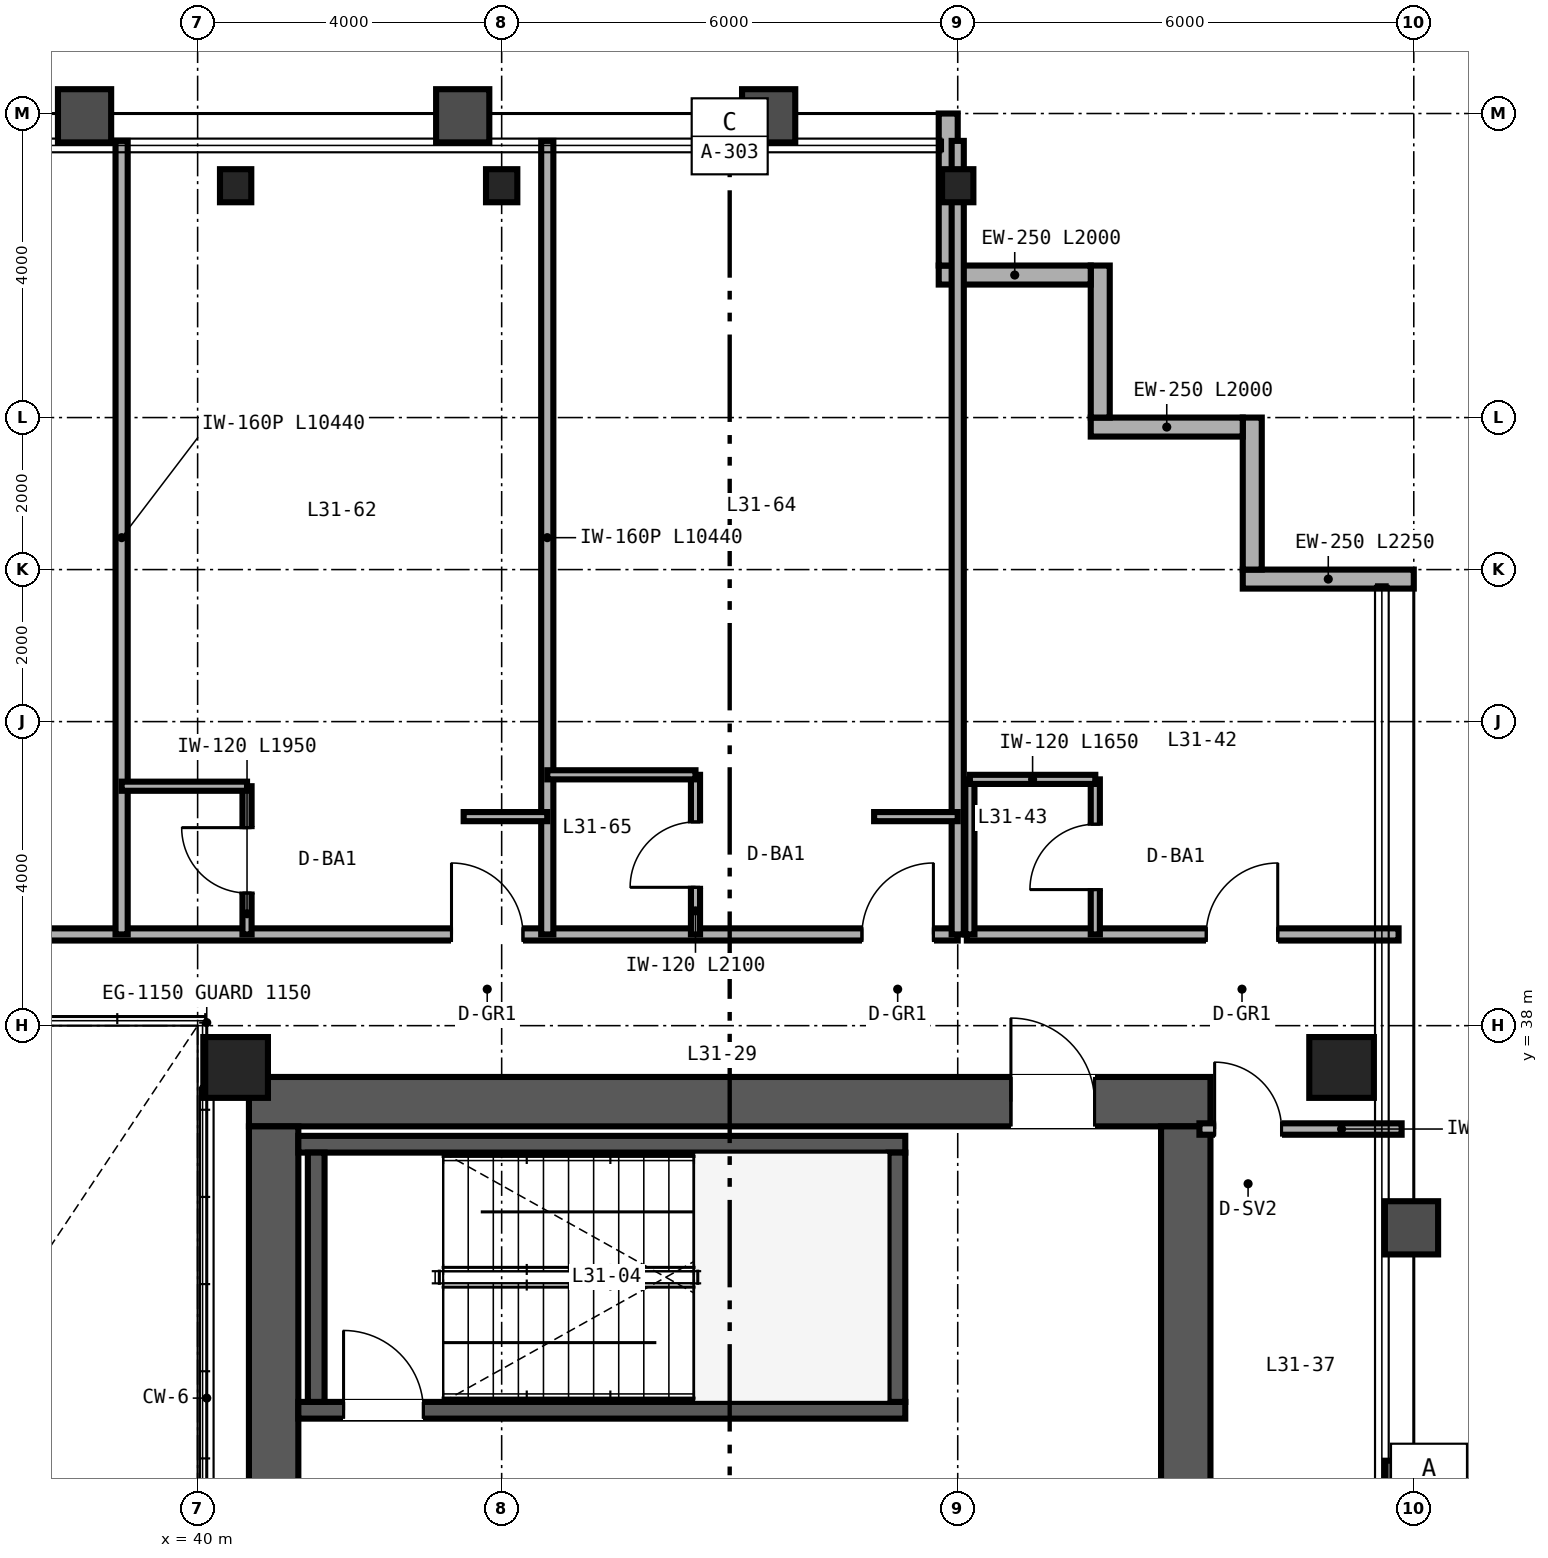
"""IFC4 building model, lengths in metres.
Left out: names, types, materials, properties, quantities, classifications, styles, units other than length and angle.
Written with IfcOpenShell. Run it as: python <this file> out.ifc"""

import sys

from ifc_helpers import new_model, si_unit, direction, frame, frame_2d, origin, origin_2d, place, context, subcontext, project, spatial, rectangle, hollow_rectangle, i_section, extrude, source, transform, mapped, element, fill, save


model = new_model("IFC4")
c1 = context("Model", 3, precision=1e-05, world=origin(), true_north=direction((0.0, 1.0)))
c2 = subcontext(c1, "Body", "Model", "MODEL_VIEW")
j1 = project(units=[si_unit("LENGTHUNIT", "METRE"), si_unit("PLANEANGLEUNIT", "RADIAN")], contexts=[c1])
p1 = place(None, origin())
s1 = spatial("IfcSite", under=j1, at=p1, CompositionType="ELEMENT")
p2 = place(p1, origin())
s2 = spatial("IfcBuilding", under=s1, at=p2, CompositionType="ELEMENT")
p3 = place(p2, frame((0.0, 0.0, 126.0)))
s3 = spatial("IfcBuildingStorey", under=s2, at=p3, CompositionType="ELEMENT", Elevation=126.0)
p4 = place(p3, frame((40.675, 37.0, 0.0), z_axis=(0.0, 0.0, 1.0), x_axis=(1.0, 0.0, 0.0)))
e1 = element("IfcWall", 1, at=p4, inside=s3, PredefinedType="SHEAR", context=c2, shape_type="SweptSolid", body=[
    extrude(rectangle(XDim=12.65, YDim=0.65, at=frame_2d((6.325, 0.0))), origin(), (0.0, 0.0, 1.0), 3.36),
])
p5 = place(p4, frame((10.025, 0.0, 0.0)))
e2 = element("IfcOpeningElement", 2, at=p5, cuts=e1, PredefinedType="OPENING", context=c2, shape_type="SweptSolid", body=[
    extrude(rectangle(XDim=1.1, YDim=2.15, at=frame_2d((0.55, 1.075))), frame((0.0, 0.335, 0.0), z_axis=(0.0, -1.0, 0.0), x_axis=(1.0, 0.0, 0.0)), (0.0, 0.0, 1.0), 0.67),
])
for number, where, z_axis, x_axis in (
    (3, (41.0, 15.325, 0.0), (0.0, 0.0, 1.0), (0.0, 1.0, 0.0)),
    (4, (53.0, 15.325, 0.0), (0.0, 0.0, 1.0), (0.0, 1.0, 0.0)),
):
    element("IfcWall", number, at=place(p3, frame(where, z_axis=z_axis, x_axis=x_axis)), inside=s3, PredefinedType="SHEAR", context=c2, shape_type="SweptSolid", body=[
        extrude(rectangle(XDim=21.35, YDim=0.65, at=frame_2d((10.675, 0.0))), origin(), (0.0, 0.0, 1.0), 3.36),
    ])
p6 = place(p3, frame((41.325, 32.94, 0.0), z_axis=(0.0, 0.0, 1.0), x_axis=(1.0, 0.0, 0.0)))
e5 = element("IfcWall", 5, at=p6, inside=s3, PredefinedType="SHEAR", context=c2, shape_type="SweptSolid", body=[
    extrude(rectangle(XDim=7.985, YDim=0.22, at=frame_2d((3.993, 0.0))), origin(), (0.0, 0.0, 1.0), 3.4),
])
p7 = place(p6, frame((0.595, 0.0, 0.0)))
e6 = element("IfcOpeningElement", 6, at=p7, cuts=e5, PredefinedType="OPENING", context=c2, shape_type="SweptSolid", body=[
    extrude(rectangle(XDim=1.05, YDim=2.15, at=frame_2d((0.525, 1.075))), frame((0.0, 0.12, 0.0), z_axis=(0.0, -1.0, 0.0), x_axis=(1.0, 0.0, 0.0)), (0.0, 0.0, 1.0), 0.24),
])
p8 = place(p3, frame((41.325, 36.44, 0.0), z_axis=(0.0, 0.0, 1.0), x_axis=(1.0, 0.0, 0.0)))
e7 = element("IfcWall", 7, at=p8, inside=s3, PredefinedType="SHEAR", context=c2, shape_type="SweptSolid", body=[
    extrude(rectangle(XDim=7.985, YDim=0.22, at=frame_2d((3.993, 0.0))), origin(), (0.0, 0.0, 1.0), 3.4),
])
for number, where, z_axis, x_axis in (
    (8, (41.56, 33.05, 0.0), (0.0, 0.0, 1.0), (0.0, 1.0, 0.0)),
    (9, (49.2, 33.05, 0.0), (0.0, 0.0, 1.0), (0.0, 1.0, 0.0)),
):
    element("IfcWall", number, at=place(p3, frame(where, z_axis=z_axis, x_axis=x_axis)), inside=s3, PredefinedType="SHEAR", context=c2, shape_type="SweptSolid", body=[
        extrude(rectangle(XDim=3.28, YDim=0.22, at=frame_2d((1.64, 0.0))), origin(), (0.0, 0.0, 1.0), 3.4),
    ])
m1 = source(origin(), c2, "Body", "SweptSolid", [
    extrude(hollow_rectangle(XDim=0.85, YDim=0.8, WallThickness=0.032, at=origin_2d()), origin(), (0.0, 0.0, 1.0), 3.36),
])
for number, where, z_axis, x_axis in (
    (10, (40.5, 37.45, 0.0), (0.0, 0.0, 1.0), (1.0, 0.0, 0.0)),
    (11, (55.05, 37.45, 0.0), (0.0, 0.0, 1.0), (1.0, 0.0, 0.0)),
):
    element("IfcColumn", number, at=place(p3, frame(where, z_axis=z_axis, x_axis=x_axis)), inside=s3, PredefinedType="COLUMN", context=c2, shape_type="MappedRepresentation", body=[
        mapped(m1, transform((0.0, 0.0, 0.0), scale=1.0)),
    ])
m2 = source(origin(), c2, "Body", "SweptSolid", [
    extrude(i_section(OverallWidth=0.412, OverallDepth=0.435, WebThickness=0.036, FlangeThickness=0.057, FilletRadius=0.025, at=origin_2d()), origin(), (0.0, 0.0, 1.0), 3.36),
])
for number, where, z_axis, x_axis in (
    (12, (40.5, 49.05, 0.0), (0.0, 0.0, 1.0), (1.0, 0.0, 0.0)),
    (13, (44.0, 49.05, 0.0), (0.0, 0.0, 1.0), (1.0, 0.0, 0.0)),
    (14, (50.0, 49.05, 0.0), (0.0, 0.0, 1.0), (1.0, 0.0, 0.0)),
):
    element("IfcColumn", number, at=place(p3, frame(where, z_axis=z_axis, x_axis=x_axis)), inside=s3, PredefinedType="COLUMN", context=c2, shape_type="MappedRepresentation", body=[
        mapped(m2, transform((0.0, 0.0, 0.0), scale=1.0)),
    ])
p9 = place(p3, frame((56.0, 43.875, 0.0), z_axis=(0.0, 0.0, 1.0), x_axis=(-1.0, 0.0, 0.0)))
e15 = element("IfcWall", 15, at=p9, inside=s3, PredefinedType="SOLIDWALL", context=c2, shape_type="SweptSolid", body=[
    extrude(rectangle(XDim=2.25, YDim=0.25, at=frame_2d((1.125, 0.0))), origin(), (0.0, 0.0, 1.0), 3.36),
])
for number, where, z_axis, x_axis in (
    (16, (53.875, 44.0, 0.0), (0.0, 0.0, 1.0), (0.0, 1.0, 0.0)),
    (17, (53.75, 45.875, 0.0), (0.0, 0.0, 1.0), (-1.0, 0.0, 0.0)),
    (18, (51.875, 46.0, 0.0), (0.0, 0.0, 1.0), (0.0, 1.0, 0.0)),
    (19, (51.75, 47.875, 0.0), (0.0, 0.0, 1.0), (-1.0, 0.0, 0.0)),
):
    element("IfcWall", number, at=place(p3, frame(where, z_axis=z_axis, x_axis=x_axis)), inside=s3, PredefinedType="SOLIDWALL", context=c2, shape_type="SweptSolid", body=[
        extrude(rectangle(XDim=2.0, YDim=0.25, at=frame_2d((1.0, 0.0))), origin(), (0.0, 0.0, 1.0), 3.36),
    ])
p10 = place(p3, frame((49.875, 48.0, 0.0), z_axis=(0.0, 0.0, 1.0), x_axis=(0.0, 1.0, 0.0)))
e20 = element("IfcWall", 20, at=p10, inside=s3, PredefinedType="SOLIDWALL", context=c2, shape_type="SweptSolid", body=[
    extrude(rectangle(XDim=2.0, YDim=0.25, at=frame_2d((1.0, 0.0))), origin(), (0.0, 0.0, 1.0), 2.667),
])
p11 = place(p3, frame((53.18, 36.64, 0.0), z_axis=(0.0, 0.0, 1.0), x_axis=(1.0, 0.0, 0.0)))
e21 = element("IfcWall", 21, at=p11, inside=s3, PredefinedType="PARTITIONING", context=c2, shape_type="SweptSolid", body=[
    extrude(rectangle(XDim=2.66, YDim=0.15, at=frame_2d((1.33, 0.0))), origin(), (0.0, 0.0, 1.0), 2.743),
])
p12 = place(p11, frame((0.2, 0.0, 0.0)))
e22 = element("IfcOpeningElement", 22, at=p12, cuts=e21, PredefinedType="OPENING", context=c2, shape_type="SweptSolid", body=[
    extrude(rectangle(XDim=0.88, YDim=2.15, at=frame_2d((0.44, 1.075))), frame((0.0, 0.085, 0.0), z_axis=(0.0, -1.0, 0.0), x_axis=(1.0, 0.0, 0.0)), (0.0, 0.0, 1.0), 0.17),
])
p13 = place(p3, frame((50.12, 39.2, 0.0), z_axis=(0.0, 0.0, 1.0), x_axis=(1.0, 0.0, 0.0)))
e23 = element("IfcWall", 23, at=p13, inside=s3, PredefinedType="PARTITIONING", context=c2, shape_type="SweptSolid", body=[
    extrude(rectangle(XDim=5.68, YDim=0.16, at=frame_2d((2.84, 0.0))), origin(), (0.0, 0.0, 1.0), 3.36),
])
p14 = place(p13, frame((3.15, 0.0, 0.0)))
e24 = element("IfcOpeningElement", 24, at=p14, cuts=e23, PredefinedType="OPENING", context=c2, shape_type="SweptSolid", body=[
    extrude(rectangle(XDim=0.94, YDim=2.15, at=frame_2d((0.47, 1.075))), frame((0.0, 0.09, 0.0), z_axis=(0.0, -1.0, 0.0), x_axis=(1.0, 0.0, 0.0)), (0.0, 0.0, 1.0), 0.18),
])
p15 = place(p3, frame((51.81, 39.2, 0.0), z_axis=(0.0, 0.0, 1.0), x_axis=(0.0, 1.0, 0.0)))
e25 = element("IfcWall", 25, at=p15, inside=s3, PredefinedType="PARTITIONING", context=c2, shape_type="SweptSolid", body=[
    extrude(rectangle(XDim=2.04, YDim=0.12, at=frame_2d((1.02, 0.0))), origin(), (0.0, 0.0, 1.0), 3.36),
])
p16 = place(p15, frame((0.59, 0.0, 0.0)))
e26 = element("IfcOpeningElement", 26, at=p16, cuts=e25, PredefinedType="OPENING", context=c2, shape_type="SweptSolid", body=[
    extrude(rectangle(XDim=0.86, YDim=2.1, at=frame_2d((0.43, 1.05))), frame((0.0, 0.07, 0.0), z_axis=(0.0, -1.0, 0.0), x_axis=(1.0, 0.0, 0.0)), (0.0, 0.0, 1.0), 0.14),
])
p17 = place(p3, frame((50.16, 39.2, 0.0), z_axis=(0.0, 0.0, 1.0), x_axis=(0.0, 1.0, 0.0)))
e27 = element("IfcWall", 27, at=p17, inside=s3, PredefinedType="PARTITIONING", context=c2, shape_type="SweptSolid", body=[
    extrude(rectangle(XDim=2.04, YDim=0.12, at=frame_2d((1.02, 0.0))), origin(), (0.0, 0.0, 1.0), 3.36),
])
p18 = place(p3, frame((50.16, 41.24, 0.0), z_axis=(0.0, 0.0, 1.0), x_axis=(1.0, 0.0, 0.0)))
e28 = element("IfcWall", 28, at=p18, inside=s3, PredefinedType="PARTITIONING", context=c2, shape_type="SweptSolid", body=[
    extrude(rectangle(XDim=1.65, YDim=0.12, at=frame_2d((0.825, 0.0))), origin(), (0.0, 0.0, 1.0), 3.36),
])
p19 = place(p3, frame((14.0, 39.2, 0.0), z_axis=(0.0, 0.0, 1.0), x_axis=(1.0, 0.0, 0.0)))
e29 = element("IfcWall", 29, at=p19, inside=s3, PredefinedType="PARTITIONING", context=c2, shape_type="SweptSolid", body=[
    extrude(rectangle(XDim=36.0, YDim=0.16, at=frame_2d((18.0, 0.0))), origin(), (0.0, 0.0, 1.0), 2.581),
])
p20 = place(p19, frame((4.94, 0.0, 0.0)))
e30 = element("IfcOpeningElement", 30, at=p20, cuts=e29, PredefinedType="OPENING", context=c2, shape_type="SweptSolid", body=[
    extrude(rectangle(XDim=0.94, YDim=2.15, at=frame_2d((0.47, 1.075))), frame((0.0, 0.09, 0.0), z_axis=(0.0, -1.0, 0.0), x_axis=(1.0, 0.0, 0.0)), (0.0, 0.0, 1.0), 0.18),
])
p21 = place(p19, frame((11.14, 0.0, 0.0)))
e31 = element("IfcOpeningElement", 31, at=p21, cuts=e29, PredefinedType="OPENING", context=c2, shape_type="SweptSolid", body=[
    extrude(rectangle(XDim=0.94, YDim=2.15, at=frame_2d((0.47, 1.075))), frame((0.0, 0.09, 0.0), z_axis=(0.0, -1.0, 0.0), x_axis=(1.0, 0.0, 0.0)), (0.0, 0.0, 1.0), 0.18),
])
p22 = place(p19, frame((15.12, 0.0, 0.0)))
e32 = element("IfcOpeningElement", 32, at=p22, cuts=e29, PredefinedType="OPENING", context=c2, shape_type="SweptSolid", body=[
    extrude(rectangle(XDim=0.96, YDim=2.15, at=frame_2d((0.48, 1.075))), frame((0.0, 0.09, 0.0), z_axis=(0.0, -1.0, 0.0), x_axis=(1.0, 0.0, 0.0)), (0.0, 0.0, 1.0), 0.18),
])
p23 = place(p19, frame((21.42, 0.0, 0.0)))
e33 = element("IfcOpeningElement", 33, at=p23, cuts=e29, PredefinedType="OPENING", context=c2, shape_type="SweptSolid", body=[
    extrude(rectangle(XDim=0.96, YDim=2.15, at=frame_2d((0.48, 1.075))), frame((0.0, 0.09, 0.0), z_axis=(0.0, -1.0, 0.0), x_axis=(1.0, 0.0, 0.0)), (0.0, 0.0, 1.0), 0.18),
])
p24 = place(p19, frame((29.34, 0.0, 0.0)))
e34 = element("IfcOpeningElement", 34, at=p24, cuts=e29, PredefinedType="OPENING", context=c2, shape_type="SweptSolid", body=[
    extrude(rectangle(XDim=0.94, YDim=2.15, at=frame_2d((0.47, 1.075))), frame((0.0, 0.09, 0.0), z_axis=(0.0, -1.0, 0.0), x_axis=(1.0, 0.0, 0.0)), (0.0, 0.0, 1.0), 0.18),
])
p25 = place(p19, frame((34.74, 0.0, 0.0)))
e35 = element("IfcOpeningElement", 35, at=p25, cuts=e29, PredefinedType="OPENING", context=c2, shape_type="SweptSolid", body=[
    extrude(rectangle(XDim=0.94, YDim=2.15, at=frame_2d((0.47, 1.075))), frame((0.0, 0.09, 0.0), z_axis=(0.0, -1.0, 0.0), x_axis=(1.0, 0.0, 0.0)), (0.0, 0.0, 1.0), 0.18),
])
p26 = place(p3, frame((50.0, 39.2, 0.0), z_axis=(0.0, 0.0, 1.0), x_axis=(0.0, 1.0, 0.0)))
e36 = element("IfcWall", 36, at=p26, inside=s3, PredefinedType="PARTITIONING", context=c2, shape_type="SweptSolid", body=[
    extrude(rectangle(XDim=10.44, YDim=0.16, at=frame_2d((5.22, 0.0))), origin(), (0.0, 0.0, 1.0), 2.667),
])
p27 = place(p3, frame((39.0, 39.2, 0.0), z_axis=(0.0, 0.0, 1.0), x_axis=(0.0, 1.0, 0.0)))
e37 = element("IfcWall", 37, at=p27, inside=s3, PredefinedType="PARTITIONING", context=c2, shape_type="SweptSolid", body=[
    extrude(rectangle(XDim=10.44, YDim=0.16, at=frame_2d((5.22, 0.0))), origin(), (0.0, 0.0, 1.0), 2.433),
])
p28 = place(p3, frame((44.6, 39.2, 0.0), z_axis=(0.0, 0.0, 1.0), x_axis=(0.0, 1.0, 0.0)))
e38 = element("IfcWall", 38, at=p28, inside=s3, PredefinedType="PARTITIONING", context=c2, shape_type="SweptSolid", body=[
    extrude(rectangle(XDim=10.44, YDim=0.16, at=frame_2d((5.22, 0.0))), origin(), (0.0, 0.0, 1.0), 2.667),
])
p29 = place(p3, frame((40.65, 39.2, 0.0), z_axis=(0.0, 0.0, 1.0), x_axis=(0.0, 1.0, 0.0)))
e39 = element("IfcWall", 39, at=p29, inside=s3, PredefinedType="PARTITIONING", context=c2, shape_type="SweptSolid", body=[
    extrude(rectangle(XDim=1.95, YDim=0.12, at=frame_2d((0.975, 0.0))), origin(), (0.0, 0.0, 1.0), 2.581),
])
p30 = place(p29, frame((0.545, 0.0, 0.0)))
e40 = element("IfcOpeningElement", 40, at=p30, cuts=e39, PredefinedType="OPENING", context=c2, shape_type="SweptSolid", body=[
    extrude(rectangle(XDim=0.86, YDim=2.1, at=frame_2d((0.43, 1.05))), frame((0.0, 0.07, 0.0), z_axis=(0.0, -1.0, 0.0), x_axis=(1.0, 0.0, 0.0)), (0.0, 0.0, 1.0), 0.14),
])
p31 = place(p3, frame((39.0, 41.15, 0.0), z_axis=(0.0, 0.0, 1.0), x_axis=(1.0, 0.0, 0.0)))
e41 = element("IfcWall", 41, at=p31, inside=s3, PredefinedType="PARTITIONING", context=c2, shape_type="SweptSolid", body=[
    extrude(rectangle(XDim=1.65, YDim=0.12, at=frame_2d((0.825, 0.0))), origin(), (0.0, 0.0, 1.0), 2.581),
])
p32 = place(p3, frame((43.5, 40.75, 0.0), z_axis=(0.0, 0.0, 1.0), x_axis=(1.0, 0.0, 0.0)))
e42 = element("IfcWall", 42, at=p32, inside=s3, PredefinedType="PARTITIONING", context=c2, shape_type="SweptSolid", body=[
    extrude(rectangle(XDim=1.1, YDim=0.12, at=frame_2d((0.55, 0.0))), origin(), (0.0, 0.0, 1.0), 3.36),
])
p33 = place(p3, frame((46.55, 39.2, 0.0), z_axis=(0.0, 0.0, 1.0), x_axis=(0.0, 1.0, 0.0)))
e43 = element("IfcWall", 43, at=p33, inside=s3, PredefinedType="PARTITIONING", context=c2, shape_type="SweptSolid", body=[
    extrude(rectangle(XDim=2.1, YDim=0.12, at=frame_2d((1.05, 0.0))), origin(), (0.0, 0.0, 1.0), 3.36),
])
p34 = place(p33, frame((0.62, 0.0, 0.0)))
e44 = element("IfcOpeningElement", 44, at=p34, cuts=e43, PredefinedType="OPENING", context=c2, shape_type="SweptSolid", body=[
    extrude(rectangle(XDim=0.86, YDim=2.1, at=frame_2d((0.43, 1.05))), frame((0.0, 0.07, 0.0), z_axis=(0.0, -1.0, 0.0), x_axis=(1.0, 0.0, 0.0)), (0.0, 0.0, 1.0), 0.14),
])
p35 = place(p3, frame((44.6, 41.3, 0.0), z_axis=(0.0, 0.0, 1.0), x_axis=(1.0, 0.0, 0.0)))
e45 = element("IfcWall", 45, at=p35, inside=s3, PredefinedType="PARTITIONING", context=c2, shape_type="SweptSolid", body=[
    extrude(rectangle(XDim=1.95, YDim=0.12, at=frame_2d((0.975, 0.0))), origin(), (0.0, 0.0, 1.0), 3.36),
])
p36 = place(p3, frame((48.9, 40.75, 0.0), z_axis=(0.0, 0.0, 1.0), x_axis=(1.0, 0.0, 0.0)))
e46 = element("IfcWall", 46, at=p36, inside=s3, PredefinedType="PARTITIONING", context=c2, shape_type="SweptSolid", body=[
    extrude(rectangle(XDim=1.1, YDim=0.12, at=frame_2d((0.55, 0.0))), origin(), (0.0, 0.0, 1.0), 3.36),
])
m3 = source(origin(), c2, "Body", "SweptSolid", [
    extrude(rectangle(XDim=1.05, YDim=2.15, at=frame_2d((0.525, 1.075))), frame((0.0, 0.025, 0.0), z_axis=(0.0, -1.0, 0.0), x_axis=(1.0, 0.0, 0.0)), (0.0, 0.0, 1.0), 0.05),
])
p37 = place(p7, origin())
e47 = element("IfcDoor", 47, at=p37, inside=s3, OperationType="SINGLE_SWING_LEFT", PredefinedType="DOOR", context=c2, shape_type="MappedRepresentation", body=[
    mapped(m3, transform((0.0, 0.0, 0.0), scale=1.0)),
])
fill(e6, e47)
m4 = source(origin(), c2, "Body", "SweptSolid", [
    extrude(rectangle(XDim=1.1, YDim=2.15, at=frame_2d((0.55, 1.075))), frame((0.0, 0.025, 0.0), z_axis=(0.0, -1.0, 0.0), x_axis=(1.0, 0.0, 0.0)), (0.0, 0.0, 1.0), 0.05),
])
p38 = place(p5, origin())
e48 = element("IfcDoor", 48, at=p38, inside=s3, OperationType="SINGLE_SWING_LEFT", PredefinedType="DOOR", context=c2, shape_type="MappedRepresentation", body=[
    mapped(m4, transform((0.0, 0.0, 0.0), scale=1.0)),
])
fill(e2, e48)
m5 = source(origin(), c2, "Body", "SweptSolid", [
    extrude(rectangle(XDim=0.88, YDim=2.15, at=frame_2d((0.44, 1.075))), frame((0.0, 0.025, 0.0), z_axis=(0.0, -1.0, 0.0), x_axis=(1.0, 0.0, 0.0)), (0.0, 0.0, 1.0), 0.05),
])
p39 = place(p12, origin())
e49 = element("IfcDoor", 49, at=p39, inside=s3, OperationType="SINGLE_SWING_LEFT", PredefinedType="DOOR", context=c2, shape_type="MappedRepresentation", body=[
    mapped(m5, transform((0.0, 0.0, 0.0), scale=1.0)),
])
fill(e22, e49)
m6 = source(origin(), c2, "Body", "SweptSolid", [
    extrude(rectangle(XDim=0.86, YDim=2.1, at=frame_2d((0.43, 1.05))), frame((0.0, 0.025, 0.0), z_axis=(0.0, -1.0, 0.0), x_axis=(1.0, 0.0, 0.0)), (0.0, 0.0, 1.0), 0.05),
])
p40 = place(p16, origin())
e50 = element("IfcDoor", 50, at=p40, inside=s3, OperationType="SINGLE_SWING_LEFT", PredefinedType="DOOR", context=c2, shape_type="MappedRepresentation", body=[
    mapped(m6, transform((0.0, 0.0, 0.0), scale=1.0)),
])
fill(e26, e50)
m7 = source(origin(), c2, "Body", "SweptSolid", [
    extrude(rectangle(XDim=0.94, YDim=2.15, at=frame_2d((0.47, 1.075))), frame((0.0, 0.025, 0.0), z_axis=(0.0, -1.0, 0.0), x_axis=(1.0, 0.0, 0.0)), (0.0, 0.0, 1.0), 0.05),
])
p41 = place(p14, origin())
e51 = element("IfcDoor", 51, at=p41, inside=s3, OperationType="SINGLE_SWING_RIGHT", PredefinedType="DOOR", context=c2, shape_type="MappedRepresentation", body=[
    mapped(m7, transform((0.0, 0.0, 0.0), scale=1.0)),
])
fill(e24, e51)
p42 = place(p30, origin())
e52 = element("IfcDoor", 52, at=p42, inside=s3, OperationType="SINGLE_SWING_RIGHT", PredefinedType="DOOR", context=c2, shape_type="MappedRepresentation", body=[
    mapped(m6, transform((0.0, 0.0, 0.0), scale=1.0)),
])
fill(e40, e52)
p43 = place(p34, origin())
e53 = element("IfcDoor", 53, at=p43, inside=s3, OperationType="SINGLE_SWING_LEFT", PredefinedType="DOOR", context=c2, shape_type="MappedRepresentation", body=[
    mapped(m6, transform((0.0, 0.0, 0.0), scale=1.0)),
])
fill(e44, e53)
p44 = place(p24, origin())
e54 = element("IfcDoor", 54, at=p44, inside=s3, OperationType="SINGLE_SWING_LEFT", PredefinedType="DOOR", context=c2, shape_type="MappedRepresentation", body=[
    mapped(m7, transform((0.0, 0.0, 0.0), scale=1.0)),
])
fill(e34, e54)
p45 = place(p25, origin())
e55 = element("IfcDoor", 55, at=p45, inside=s3, OperationType="SINGLE_SWING_RIGHT", PredefinedType="DOOR", context=c2, shape_type="MappedRepresentation", body=[
    mapped(m7, transform((0.0, 0.0, 0.0), scale=1.0)),
])
fill(e35, e55)
save(model, sys.argv[1])
